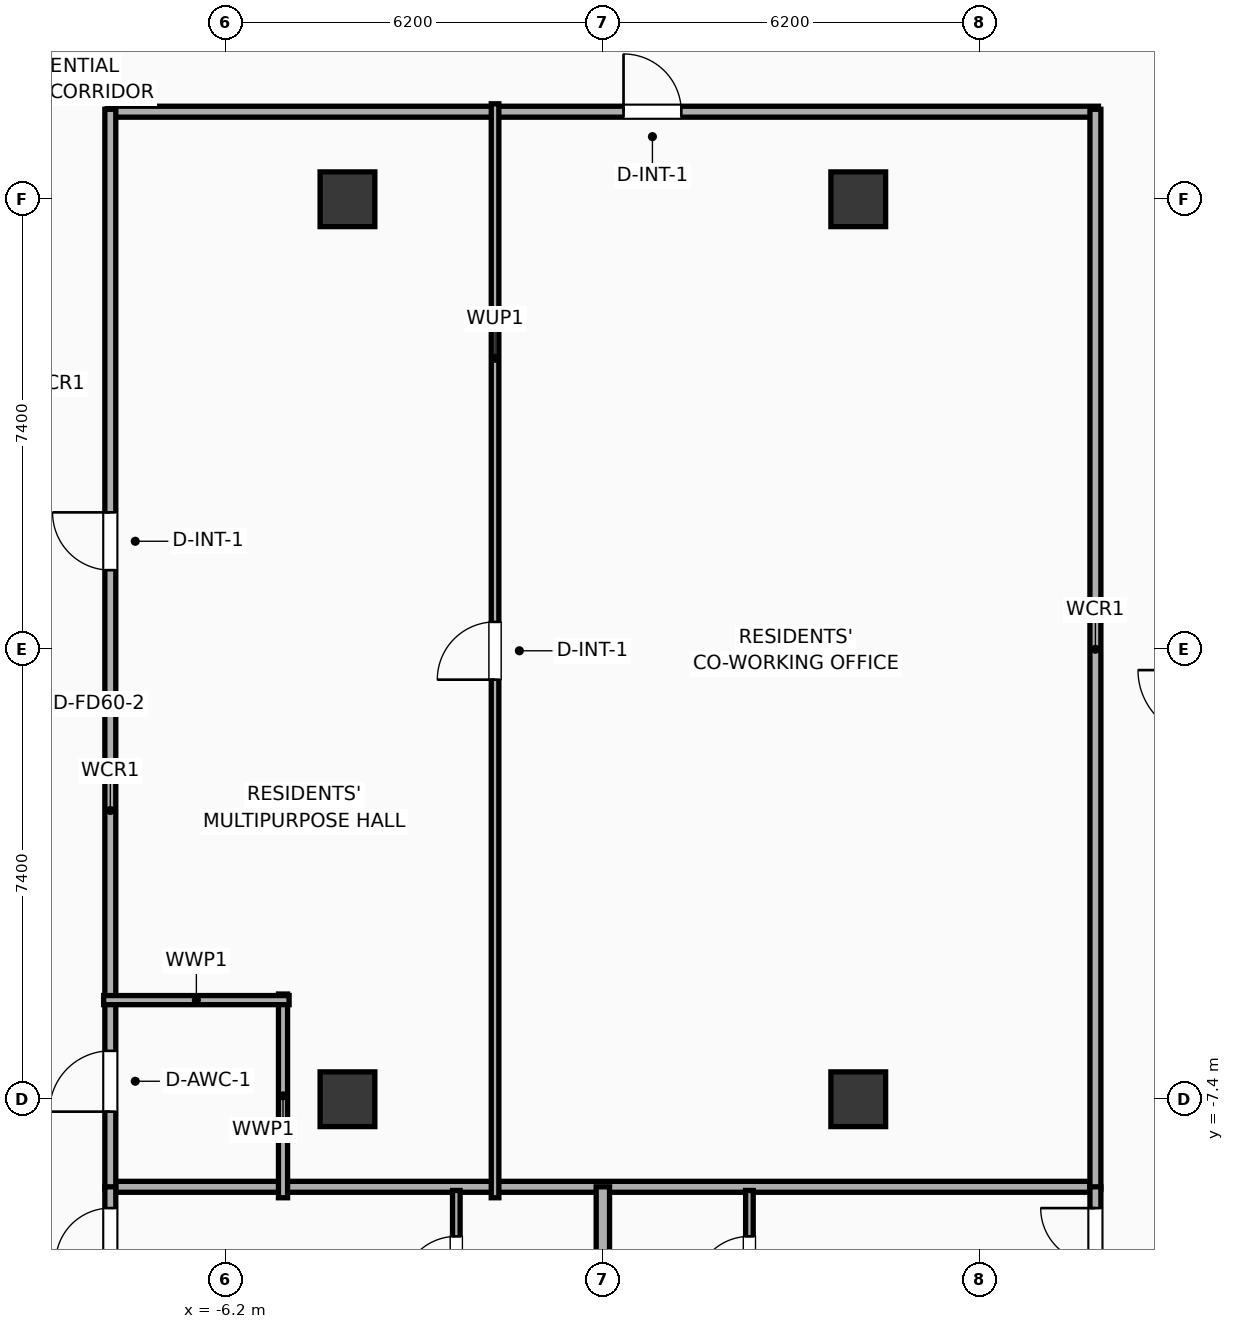
"""IFC4 building model, lengths in metres.
Left out: names, types, materials, properties, quantities, classifications, styles, units other than length and angle.
Written with IfcOpenShell. Run it as: python <this file> out.ifc"""

import sys

from ifc_helpers import new_model, si_unit, direction, frame, frame_2d, origin, origin_2d, place, context, subcontext, project, spatial, rectangle, extrude, element, fill, save


model = new_model("IFC4")
c1 = context("Model", 3, precision=1e-05, world=origin(), true_north=direction((0.0, 1.0)))
c2 = subcontext(c1, "Body", "Model", "MODEL_VIEW")
j1 = project(units=[si_unit("LENGTHUNIT", "METRE"), si_unit("PLANEANGLEUNIT", "RADIAN")], contexts=[c1])
p1 = place(None, origin())
s1 = spatial("IfcSite", under=j1, at=p1, CompositionType="ELEMENT")
p2 = place(p1, origin())
s2 = spatial("IfcBuilding", under=s1, at=p2, CompositionType="ELEMENT")
p3 = place(p2, frame((0.0, 0.0, 204.1)))
s3 = spatial("IfcBuildingStorey", under=s2, at=p3, CompositionType="ELEMENT", Elevation=204.1)
for number, where, z_axis, x_axis in (
    (1, (-4.2, -7.4, 0.0), (0.0, 0.0, 1.0), (1.0, 0.0, 0.0)),
    (2, (-4.2, 7.4, 0.0), (0.0, 0.0, 1.0), (1.0, 0.0, 0.0)),
    (3, (4.2, -7.4, 0.0), (0.0, 0.0, 1.0), (1.0, 0.0, 0.0)),
    (4, (4.2, 7.4, 0.0), (0.0, 0.0, 1.0), (1.0, 0.0, 0.0)),
):
    element("IfcColumn", number, at=place(p3, frame(where, z_axis=z_axis, x_axis=x_axis)), inside=s3, PredefinedType="COLUMN", context=c2, shape_type="SweptSolid", body=[
        extrude(rectangle(XDim=0.9, YDim=0.9, at=origin_2d()), origin(), (0.0, 0.0, 1.0), 3.9),
    ])
p4 = place(p3, frame((-8.15, 8.84, 0.0), z_axis=(0.0, 0.0, 1.0), x_axis=(1.0, 0.0, 0.0)))
e5 = element("IfcWall", 5, at=p4, inside=s3, PredefinedType="PARTITIONING", context=c2, shape_type="SweptSolid", body=[
    extrude(rectangle(XDim=16.3, YDim=0.18, at=frame_2d((8.15, 0.0))), origin(), (0.0, 0.0, 1.0), 3.65),
])
p5 = place(p4, frame((8.49, 0.0, 0.0)))
e6 = element("IfcOpeningElement", 6, at=p5, cuts=e5, PredefinedType="OPENING", context=c2, shape_type="SweptSolid", body=[
    extrude(rectangle(XDim=0.95, YDim=2.05, at=frame_2d((0.475, 1.025))), frame((0.0, 0.1, 0.0), z_axis=(0.0, -1.0, 0.0), x_axis=(1.0, 0.0, 0.0)), (0.0, 0.0, 1.0), 0.2),
])
p6 = place(p3, frame((-8.15, -8.84, 0.0), z_axis=(0.0, 0.0, 1.0), x_axis=(1.0, 0.0, 0.0)))
e7 = element("IfcWall", 7, at=p6, inside=s3, PredefinedType="PARTITIONING", context=c2, shape_type="SweptSolid", body=[
    extrude(rectangle(XDim=16.3, YDim=0.18, at=frame_2d((8.15, 0.0))), origin(), (0.0, 0.0, 1.0), 3.65),
])
p7 = place(p3, frame((-8.1, -8.88, 0.0), z_axis=(0.0, 0.0, 1.0), x_axis=(0.0, 1.0, 0.0)))
e8 = element("IfcWall", 8, at=p7, inside=s3, PredefinedType="PARTITIONING", context=c2, shape_type="SweptSolid", body=[
    extrude(rectangle(XDim=17.76, YDim=0.18, at=frame_2d((8.88, 0.0))), origin(), (0.0, 0.0, 1.0), 3.65),
])
p8 = place(p7, frame((1.276, 0.0, 0.0)))
e9 = element("IfcOpeningElement", 9, at=p8, cuts=e8, PredefinedType="OPENING", context=c2, shape_type="SweptSolid", body=[
    extrude(rectangle(XDim=1.0, YDim=2.05, at=frame_2d((0.5, 1.025))), frame((0.0, 0.1, 0.0), z_axis=(0.0, -1.0, 0.0), x_axis=(1.0, 0.0, 0.0)), (0.0, 0.0, 1.0), 0.2),
])
p9 = place(p7, frame((10.181, 0.0, 0.0)))
e10 = element("IfcOpeningElement", 10, at=p9, cuts=e8, PredefinedType="OPENING", context=c2, shape_type="SweptSolid", body=[
    extrude(rectangle(XDim=0.95, YDim=2.05, at=frame_2d((0.475, 1.025))), frame((0.0, 0.1, 0.0), z_axis=(0.0, -1.0, 0.0), x_axis=(1.0, 0.0, 0.0)), (0.0, 0.0, 1.0), 0.2),
])
p10 = place(p3, frame((8.1, -8.88, 0.0), z_axis=(0.0, 0.0, 1.0), x_axis=(0.0, 1.0, 0.0)))
e11 = element("IfcWall", 11, at=p10, inside=s3, PredefinedType="PARTITIONING", context=c2, shape_type="SweptSolid", body=[
    extrude(rectangle(XDim=17.76, YDim=0.18, at=frame_2d((8.88, 0.0))), origin(), (0.0, 0.0, 1.0), 3.65),
])
p11 = place(p3, frame((-5.26, -9.02, 0.0), z_axis=(0.0, 0.0, 1.0), x_axis=(0.0, 1.0, 0.0)))
e12 = element("IfcWall", 12, at=p11, inside=s3, PredefinedType="PLUMBINGWALL", context=c2, shape_type="SweptSolid", body=[
    extrude(rectangle(XDim=3.35, YDim=0.15, at=frame_2d((1.675, 0.0))), origin(), (0.0, 0.0, 1.0), 3.65),
])
p12 = place(p3, frame((-8.21, -5.77, 0.0), z_axis=(0.0, 0.0, 1.0), x_axis=(1.0, 0.0, 0.0)))
e13 = element("IfcWall", 13, at=p12, inside=s3, PredefinedType="PLUMBINGWALL", context=c2, shape_type="SweptSolid", body=[
    extrude(rectangle(XDim=3.05, YDim=0.15, at=frame_2d((1.525, 0.0))), origin(), (0.0, 0.0, 1.0), 3.65),
])
p13 = place(p3, frame((-1.773, -9.02, 0.0), z_axis=(0.0, 0.0, 1.0), x_axis=(0.0, 1.0, 0.0)))
e14 = element("IfcWall", 14, at=p13, inside=s3, PredefinedType="PARTITIONING", context=c2, shape_type="SweptSolid", body=[
    extrude(rectangle(XDim=17.99, YDim=0.125, at=frame_2d((8.995, 0.0))), origin(), (0.0, 0.0, 1.0), 3.65),
])
p14 = place(p13, frame((8.52, 0.0, 0.0)))
e15 = element("IfcOpeningElement", 15, at=p14, cuts=e14, PredefinedType="OPENING", context=c2, shape_type="SweptSolid", body=[
    extrude(rectangle(XDim=0.95, YDim=2.05, at=frame_2d((0.475, 1.025))), frame((0.0, 0.073, 0.0), z_axis=(0.0, -1.0, 0.0), x_axis=(1.0, 0.0, 0.0)), (0.0, 0.0, 1.0), 0.145),
])
p15 = place(p3, frame((-2.41, -11.31, 0.0), z_axis=(0.0, 0.0, 1.0), x_axis=(0.0, 1.0, 0.0)))
e16 = element("IfcWall", 16, at=p15, inside=s3, PredefinedType="PARTITIONING", context=c2, shape_type="SweptSolid", body=[
    extrude(rectangle(XDim=2.41, YDim=0.125, at=frame_2d((1.205, 0.0))), origin(), (0.0, 0.0, 1.0), 3.65),
])
p16 = place(p15, frame((0.755, 0.0, 0.0)))
e17 = element("IfcOpeningElement", 17, at=p16, cuts=e16, PredefinedType="OPENING", context=c2, shape_type="SweptSolid", body=[
    extrude(rectangle(XDim=0.9, YDim=2.05, at=frame_2d((0.45, 1.025))), frame((0.0, 0.073, 0.0), z_axis=(0.0, -1.0, 0.0), x_axis=(1.0, 0.0, 0.0)), (0.0, 0.0, 1.0), 0.145),
])
p17 = place(p3, frame((-8.1, -18.83, 0.0), z_axis=(0.0, 0.0, 1.0), x_axis=(0.0, 1.0, 0.0)))
e18 = element("IfcWall", 18, at=p17, inside=s3, PredefinedType="PARTITIONING", context=c2, shape_type="SweptSolid", body=[
    extrude(rectangle(XDim=9.99, YDim=0.18, at=frame_2d((4.995, 0.0))), origin(), (0.0, 0.0, 1.0), 3.65),
])
p18 = place(p17, frame((8.74, 0.0, 0.0)))
e19 = element("IfcOpeningElement", 19, at=p18, cuts=e18, PredefinedType="OPENING", context=c2, shape_type="SweptSolid", body=[
    extrude(rectangle(XDim=0.9, YDim=2.05, at=frame_2d((0.45, 1.025))), frame((0.0, 0.1, 0.0), z_axis=(0.0, -1.0, 0.0), x_axis=(1.0, 0.0, 0.0)), (0.0, 0.0, 1.0), 0.2),
])
p19 = place(p3, frame((2.41, -11.31, 0.0), z_axis=(0.0, 0.0, 1.0), x_axis=(0.0, 1.0, 0.0)))
e20 = element("IfcWall", 20, at=p19, inside=s3, PredefinedType="PARTITIONING", context=c2, shape_type="SweptSolid", body=[
    extrude(rectangle(XDim=2.41, YDim=0.125, at=frame_2d((1.205, 0.0))), origin(), (0.0, 0.0, 1.0), 3.65),
])
p20 = place(p19, frame((0.755, 0.0, 0.0)))
e21 = element("IfcOpeningElement", 21, at=p20, cuts=e20, PredefinedType="OPENING", context=c2, shape_type="SweptSolid", body=[
    extrude(rectangle(XDim=0.9, YDim=2.05, at=frame_2d((0.45, 1.025))), frame((0.0, 0.073, 0.0), z_axis=(0.0, -1.0, 0.0), x_axis=(1.0, 0.0, 0.0)), (0.0, 0.0, 1.0), 0.145),
])
p21 = place(p3, frame((8.1, -18.83, 0.0), z_axis=(0.0, 0.0, 1.0), x_axis=(0.0, 1.0, 0.0)))
e22 = element("IfcWall", 22, at=p21, inside=s3, PredefinedType="PARTITIONING", context=c2, shape_type="SweptSolid", body=[
    extrude(rectangle(XDim=9.99, YDim=0.18, at=frame_2d((4.995, 0.0))), origin(), (0.0, 0.0, 1.0), 3.65),
])
p22 = place(p21, frame((8.74, 0.0, 0.0)))
e23 = element("IfcOpeningElement", 23, at=p22, cuts=e22, PredefinedType="OPENING", context=c2, shape_type="SweptSolid", body=[
    extrude(rectangle(XDim=0.9, YDim=2.05, at=frame_2d((0.45, 1.025))), frame((0.0, 0.1, 0.0), z_axis=(0.0, -1.0, 0.0), x_axis=(1.0, 0.0, 0.0)), (0.0, 0.0, 1.0), 0.2),
])
p23 = place(p3, frame((0.0, -18.83, 0.0), z_axis=(0.0, 0.0, 1.0), x_axis=(0.0, 1.0, 0.0)))
e24 = element("IfcWall", 24, at=p23, inside=s3, PredefinedType="PARTITIONING", context=c2, shape_type="SweptSolid", body=[
    extrude(rectangle(XDim=9.99, YDim=0.22, at=frame_2d((4.995, 0.0))), origin(), (0.0, 0.0, 1.0), 3.65),
])
p24 = place(p5, origin())
e25 = element("IfcDoor", 25, at=p24, inside=s3, OperationType="SINGLE_SWING_LEFT", PredefinedType="DOOR", context=c2, shape_type="SweptSolid", body=[
    extrude(rectangle(XDim=0.95, YDim=2.05, at=frame_2d((0.475, 1.025))), frame((0.0, 0.025, 0.0), z_axis=(0.0, -1.0, 0.0), x_axis=(1.0, 0.0, 0.0)), (0.0, 0.0, 1.0), 0.05),
])
fill(e6, e25)
p25 = place(p8, origin())
e26 = element("IfcDoor", 26, at=p25, inside=s3, OperationType="SINGLE_SWING_LEFT", PredefinedType="DOOR", context=c2, shape_type="SweptSolid", body=[
    extrude(rectangle(XDim=1.0, YDim=2.05, at=frame_2d((0.5, 1.025))), frame((0.0, 0.025, 0.0), z_axis=(0.0, -1.0, 0.0), x_axis=(1.0, 0.0, 0.0)), (0.0, 0.0, 1.0), 0.05),
])
fill(e9, e26)
p26 = place(p9, origin())
e27 = element("IfcDoor", 27, at=p26, inside=s3, OperationType="SINGLE_SWING_RIGHT", PredefinedType="DOOR", context=c2, shape_type="SweptSolid", body=[
    extrude(rectangle(XDim=0.95, YDim=2.05, at=frame_2d((0.475, 1.025))), frame((0.0, 0.025, 0.0), z_axis=(0.0, -1.0, 0.0), x_axis=(1.0, 0.0, 0.0)), (0.0, 0.0, 1.0), 0.05),
])
fill(e10, e27)
p27 = place(p14, origin())
e28 = element("IfcDoor", 28, at=p27, inside=s3, OperationType="SINGLE_SWING_LEFT", PredefinedType="DOOR", context=c2, shape_type="SweptSolid", body=[
    extrude(rectangle(XDim=0.95, YDim=2.05, at=frame_2d((0.475, 1.025))), frame((0.0, 0.025, 0.0), z_axis=(0.0, -1.0, 0.0), x_axis=(1.0, 0.0, 0.0)), (0.0, 0.0, 1.0), 0.05),
])
fill(e15, e28)
p28 = place(p16, origin())
e29 = element("IfcDoor", 29, at=p28, inside=s3, OperationType="SINGLE_SWING_LEFT", PredefinedType="DOOR", context=c2, shape_type="SweptSolid", body=[
    extrude(rectangle(XDim=0.9, YDim=2.05, at=frame_2d((0.45, 1.025))), frame((0.0, 0.025, 0.0), z_axis=(0.0, -1.0, 0.0), x_axis=(1.0, 0.0, 0.0)), (0.0, 0.0, 1.0), 0.05),
])
fill(e17, e29)
p29 = place(p18, origin())
e30 = element("IfcDoor", 30, at=p29, inside=s3, OperationType="SINGLE_SWING_LEFT", PredefinedType="DOOR", context=c2, shape_type="SweptSolid", body=[
    extrude(rectangle(XDim=0.9, YDim=2.05, at=frame_2d((0.45, 1.025))), frame((0.0, 0.025, 0.0), z_axis=(0.0, -1.0, 0.0), x_axis=(1.0, 0.0, 0.0)), (0.0, 0.0, 1.0), 0.05),
])
fill(e19, e30)
p30 = place(p20, origin())
e31 = element("IfcDoor", 31, at=p30, inside=s3, OperationType="SINGLE_SWING_LEFT", PredefinedType="DOOR", context=c2, shape_type="SweptSolid", body=[
    extrude(rectangle(XDim=0.9, YDim=2.05, at=frame_2d((0.45, 1.025))), frame((0.0, 0.025, 0.0), z_axis=(0.0, -1.0, 0.0), x_axis=(1.0, 0.0, 0.0)), (0.0, 0.0, 1.0), 0.05),
])
fill(e21, e31)
p31 = place(p22, origin())
e32 = element("IfcDoor", 32, at=p31, inside=s3, OperationType="SINGLE_SWING_RIGHT", PredefinedType="DOOR", context=c2, shape_type="SweptSolid", body=[
    extrude(rectangle(XDim=0.9, YDim=2.05, at=frame_2d((0.45, 1.025))), frame((0.0, 0.025, 0.0), z_axis=(0.0, -1.0, 0.0), x_axis=(1.0, 0.0, 0.0)), (0.0, 0.0, 1.0), 0.05),
])
fill(e23, e32)
save(model, sys.argv[1])
